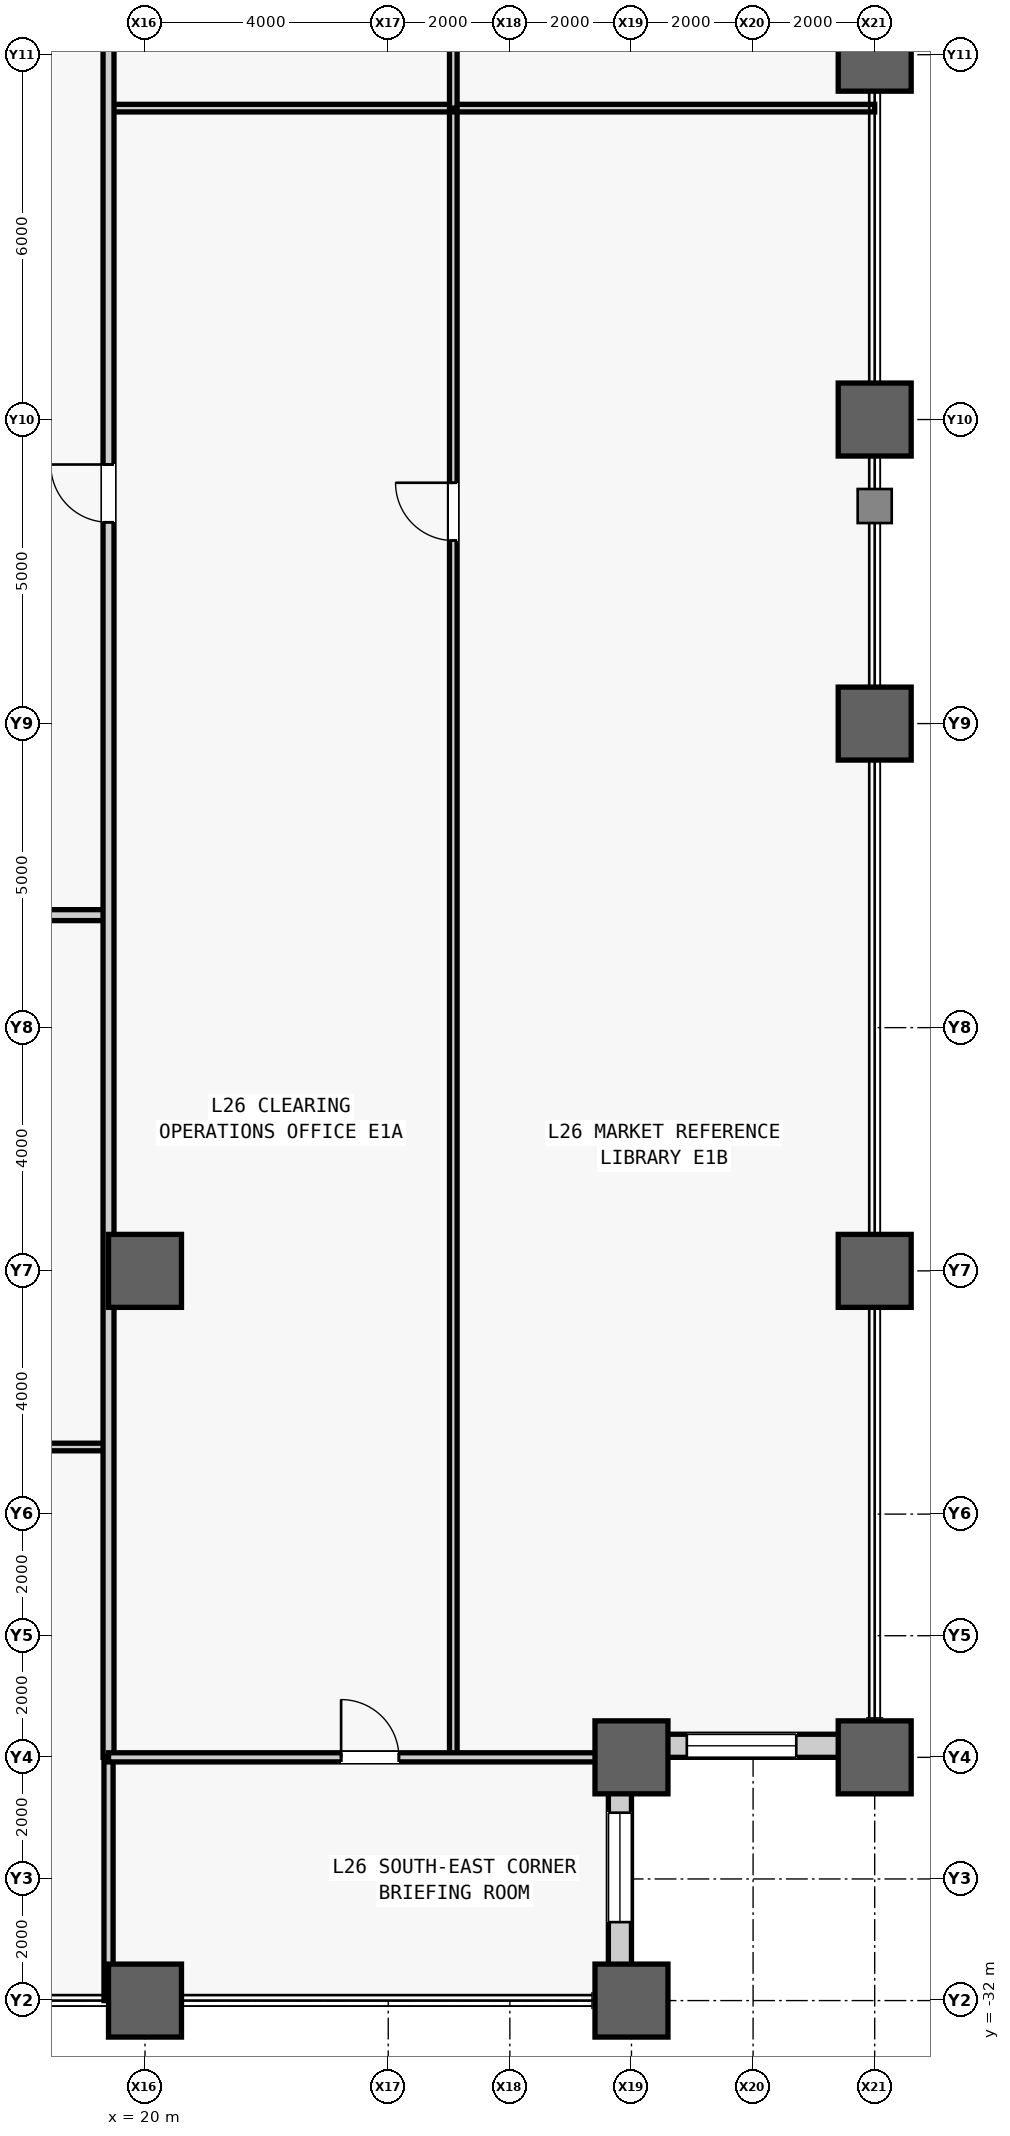
"""IFC4 building model, lengths in metres.
Left out: names, types, materials, properties, quantities, classifications, styles, units other than length and angle.
Written with IfcOpenShell. Run it as: python <this file> out.ifc"""

import sys

from ifc_helpers import new_model, si_unit, direction, frame, frame_2d, origin, origin_2d, place, context, subcontext, project, spatial, rectangle, hollow_rectangle, extrude, source, transform, mapped, element, fill, save


model = new_model("IFC4")
c1 = context("Model", 3, precision=1e-05, world=origin(), true_north=direction((0.0, 1.0)))
c2 = subcontext(c1, "Body", "Model", "MODEL_VIEW")
j1 = project(units=[si_unit("LENGTHUNIT", "METRE"), si_unit("PLANEANGLEUNIT", "RADIAN")], contexts=[c1])
p1 = place(None, origin())
s1 = spatial("IfcSite", under=j1, at=p1, CompositionType="ELEMENT")
p2 = place(p1, origin())
s2 = spatial("IfcBuilding", under=s1, at=p2, CompositionType="ELEMENT")
p3 = place(p2, frame((0.0, 0.0, 116.0)))
s3 = spatial("IfcBuildingStorey", under=s2, at=p3, CompositionType="ELEMENT", Elevation=116.0)
m1 = source(origin(), c2, "Body", "SweptSolid", [
    extrude(hollow_rectangle(XDim=1.2, YDim=1.2, WallThickness=0.07, at=origin_2d()), origin(), (0.0, 0.0, 1.0), 4.1),
])
for number, where, z_axis, x_axis in (
    (1, (20.0, -32.0, 0.0), (0.0, 0.0, 1.0), (1.0, 0.0, 0.0)),
    (2, (20.0, -20.0, 0.0), (0.0, 0.0, 1.0), (1.0, 0.0, 0.0)),
    (3, (28.0, -32.0, 0.0), (0.0, 0.0, 1.0), (1.0, 0.0, 0.0)),
    (4, (28.0, -28.0, 0.0), (0.0, 0.0, 1.0), (1.0, 0.0, 0.0)),
    (5, (32.0, -28.0, 0.0), (0.0, 0.0, 1.0), (1.0, 0.0, 0.0)),
    (6, (32.0, -20.0, 0.0), (0.0, 0.0, 1.0), (1.0, 0.0, 0.0)),
    (7, (32.0, -11.0, 0.0), (0.0, 0.0, 1.0), (1.0, 0.0, 0.0)),
    (8, (32.0, -6.0, 0.0), (0.0, 0.0, 1.0), (1.0, 0.0, 0.0)),
    (9, (32.0, 0.0, 0.0), (0.0, 0.0, 1.0), (1.0, 0.0, 0.0)),
):
    element("IfcColumn", number, at=place(p3, frame(where, z_axis=z_axis, x_axis=x_axis)), inside=s3, PredefinedType="COLUMN", context=c2, shape_type="MappedRepresentation", body=[
        mapped(m1, transform((0.0, 0.0, 0.0), scale=1.0)),
    ])
m2 = source(origin(), c2, "Body", "SweptSolid", [
    extrude(rectangle(XDim=3.62, YDim=0.38, at=frame_2d((1.81, 0.0))), origin(), (0.0, 0.0, 1.0), 3.145),
])
p4 = place(p3, frame((27.81, -31.62, 0.0), z_axis=(0.0, 0.0, 1.0), x_axis=(0.0, 1.0, 0.0)))
e10 = element("IfcWall", 10, at=p4, inside=s3, PredefinedType="STANDARD", context=c2, shape_type="MappedRepresentation", body=[
    mapped(m2, transform((0.0, 0.0, 0.0), scale=1.0)),
])
m3 = source(origin(), c2, "Body", "SweptSolid", [
    extrude(rectangle(XDim=1.8, YDim=2.4, at=frame_2d((0.9, 1.2))), frame((0.0, 0.2, 0.0), z_axis=(0.0, -1.0, 0.0), x_axis=(1.0, 0.0, 0.0)), (0.0, 0.0, 1.0), 0.4),
])
p5 = place(p4, frame((0.91, 0.0, 0.5)))
e11 = element("IfcOpeningElement", 11, at=p5, cuts=e10, PredefinedType="OPENING", context=c2, shape_type="MappedRepresentation", body=[
    mapped(m3, transform((0.0, 0.0, 0.0), scale=1.0)),
])
p6 = place(p3, frame((28.0, -27.81, 0.0), z_axis=(0.0, 0.0, 1.0), x_axis=(1.0, 0.0, 0.0)))
e12 = element("IfcWall", 12, at=p6, inside=s3, PredefinedType="STANDARD", context=c2, shape_type="MappedRepresentation", body=[
    mapped(m2, transform((0.0, 0.0, 0.0), scale=1.0)),
])
p7 = place(p6, frame((0.91, 0.0, 0.5)))
e13 = element("IfcOpeningElement", 13, at=p7, cuts=e12, PredefinedType="OPENING", context=c2, shape_type="MappedRepresentation", body=[
    mapped(m3, transform((0.0, 0.0, 0.0), scale=1.0)),
])
m4 = source(origin(), c2, "Body", "SweptSolid", [
    extrude(rectangle(XDim=37.95, YDim=0.125, at=frame_2d((18.975, 0.0))), origin(), (0.0, 0.0, 1.0), 3.84),
])
p8 = place(p3, frame((-18.55, -22.896, 0.0), z_axis=(0.0, 0.0, 1.0), x_axis=(1.0, 0.0, 0.0)))
e14 = element("IfcWall", 14, at=p8, inside=s3, PredefinedType="PARTITIONING", context=c2, shape_type="MappedRepresentation", body=[
    mapped(m4, transform((0.0, 0.0, 0.0), scale=1.0)),
])
m5 = source(origin(), c2, "Body", "SweptSolid", [
    extrude(rectangle(XDim=0.95, YDim=2.15, at=frame_2d((0.475, 1.075))), frame((0.0, 0.073, 0.0), z_axis=(0.0, -1.0, 0.0), x_axis=(1.0, 0.0, 0.0)), (0.0, 0.0, 1.0), 0.145),
])
p9 = place(p8, frame((18.5, 0.0, 0.0)))
e15 = element("IfcOpeningElement", 15, at=p9, cuts=e14, PredefinedType="OPENING", context=c2, shape_type="MappedRepresentation", body=[
    mapped(m5, transform((0.0, 0.0, 0.0), scale=1.0)),
])
m6 = source(origin(), c2, "Body", "SweptSolid", [
    extrude(rectangle(XDim=37.95, YDim=0.18, at=frame_2d((18.975, 0.0))), origin(), (0.0, 0.0, 1.0), 3.84),
])
p10 = place(p3, frame((-18.55, -14.15, 0.0), z_axis=(0.0, 0.0, 1.0), x_axis=(1.0, 0.0, 0.0)))
e16 = element("IfcWall", 16, at=p10, inside=s3, PredefinedType="PARTITIONING", context=c2, shape_type="MappedRepresentation", body=[
    mapped(m6, transform((0.0, 0.0, 0.0), scale=1.0)),
])
m7 = source(origin(), c2, "Body", "SweptSolid", [
    extrude(rectangle(XDim=1.05, YDim=2.2, at=frame_2d((0.525, 1.1))), frame((0.0, 0.1, 0.0), z_axis=(0.0, -1.0, 0.0), x_axis=(1.0, 0.0, 0.0)), (0.0, 0.0, 1.0), 0.2),
])
p11 = place(p10, frame((18.025, 0.0, 0.0)))
e17 = element("IfcOpeningElement", 17, at=p11, cuts=e16, PredefinedType="OPENING", context=c2, shape_type="MappedRepresentation", body=[
    mapped(m7, transform((0.0, 0.0, 0.0), scale=1.0)),
])
m8 = source(origin(), c2, "Body", "SweptSolid", [
    extrude(rectangle(XDim=4.0, YDim=0.15, at=frame_2d((2.0, 0.0))), origin(), (0.0, 0.0, 1.0), 3.84),
])
p12 = place(p3, frame((19.4, -32.0, 0.0), z_axis=(0.0, 0.0, 1.0), x_axis=(0.0, 1.0, 0.0)))
e18 = element("IfcWall", 18, at=p12, inside=s3, PredefinedType="PARTITIONING", context=c2, shape_type="MappedRepresentation", body=[
    mapped(m8, transform((0.0, 0.0, 0.0), scale=1.0)),
])
m9 = source(origin(), c2, "Body", "SweptSolid", [
    extrude(rectangle(XDim=27.121, YDim=0.125, at=frame_2d((13.561, 0.0))), origin(), (0.0, 0.0, 1.0), 3.84),
])
p13 = place(p3, frame((25.07, -28.0, 0.0), z_axis=(0.0, 0.0, 1.0), x_axis=(0.0, 1.0, 0.0)))
e19 = element("IfcWall", 19, at=p13, inside=s3, PredefinedType="PARTITIONING", context=c2, shape_type="MappedRepresentation", body=[
    mapped(m9, transform((0.0, 0.0, 0.0), scale=1.0)),
])
p14 = place(p13, frame((20.01, 0.0, 0.0)))
e20 = element("IfcOpeningElement", 20, at=p14, cuts=e19, PredefinedType="OPENING", context=c2, shape_type="MappedRepresentation", body=[
    mapped(m5, transform((0.0, 0.0, 0.0), scale=1.0)),
])
m10 = source(origin(), c2, "Body", "SweptSolid", [
    extrude(rectangle(XDim=12.6, YDim=0.125, at=frame_2d((6.3, 0.0))), origin(), (0.0, 0.0, 1.0), 3.84),
])
p15 = place(p3, frame((19.4, -0.879, 0.0), z_axis=(0.0, 0.0, 1.0), x_axis=(1.0, 0.0, 0.0)))
e21 = element("IfcWall", 21, at=p15, inside=s3, PredefinedType="PARTITIONING", context=c2, shape_type="MappedRepresentation", body=[
    mapped(m10, transform((0.0, 0.0, 0.0), scale=1.0)),
])
m11 = source(origin(), c2, "Body", "SweptSolid", [
    extrude(rectangle(XDim=28.879, YDim=0.125, at=frame_2d((14.439, 0.0))), origin(), (0.0, 0.0, 1.0), 3.84),
])
p16 = place(p3, frame((25.07, -0.879, 0.0), z_axis=(0.0, 0.0, 1.0), x_axis=(0.0, 1.0, 0.0)))
e22 = element("IfcWall", 22, at=p16, inside=s3, PredefinedType="PARTITIONING", context=c2, shape_type="MappedRepresentation", body=[
    mapped(m11, transform((0.0, 0.0, 0.0), scale=1.0)),
])
p17 = place(p16, frame((7.314, 0.0, 0.0)))
e23 = element("IfcOpeningElement", 23, at=p17, cuts=e22, PredefinedType="OPENING", context=c2, shape_type="MappedRepresentation", body=[
    mapped(m5, transform((0.0, 0.0, 0.0), scale=1.0)),
])
m12 = source(origin(), c2, "Body", "SweptSolid", [
    extrude(rectangle(XDim=56.0, YDim=0.18, at=frame_2d((28.0, 0.0))), origin(), (0.0, 0.0, 1.0), 3.371),
])
p18 = place(p3, frame((19.4, -28.0, 0.0), z_axis=(0.0, 0.0, 1.0), x_axis=(0.0, 1.0, 0.0)))
e24 = element("IfcWall", 24, at=p18, inside=s3, PredefinedType="PARTITIONING", context=c2, shape_type="MappedRepresentation", body=[
    mapped(m12, transform((0.0, 0.0, 0.0), scale=1.0)),
])
m13 = source(origin(), c2, "Body", "SweptSolid", [
    extrude(rectangle(XDim=0.95, YDim=2.15, at=frame_2d((0.475, 1.075))), frame((0.0, 0.1, 0.0), z_axis=(0.0, -1.0, 0.0), x_axis=(1.0, 0.0, 0.0)), (0.0, 0.0, 1.0), 0.2),
])
p19 = place(p18, frame((20.311, 0.0, 0.0)))
e25 = element("IfcOpeningElement", 25, at=p19, cuts=e24, PredefinedType="OPENING", context=c2, shape_type="MappedRepresentation", body=[
    mapped(m13, transform((0.0, 0.0, 0.0), scale=1.0)),
])
p20 = place(p18, frame((34.135, 0.0, 0.0)))
e26 = element("IfcOpeningElement", 26, at=p20, cuts=e24, PredefinedType="OPENING", context=c2, shape_type="MappedRepresentation", body=[
    mapped(m13, transform((0.0, 0.0, 0.0), scale=1.0)),
])
m14 = source(origin(), c2, "Body", "SweptSolid", [
    extrude(rectangle(XDim=8.6, YDim=0.15, at=frame_2d((4.3, 0.0))), origin(), (0.0, 0.0, 1.0), 3.84),
])
p21 = place(p3, frame((19.4, -28.0, 0.0), z_axis=(0.0, 0.0, 1.0), x_axis=(1.0, 0.0, 0.0)))
e27 = element("IfcWall", 27, at=p21, inside=s3, PredefinedType="PARTITIONING", context=c2, shape_type="MappedRepresentation", body=[
    mapped(m14, transform((0.0, 0.0, 0.0), scale=1.0)),
])
m15 = source(origin(), c2, "Body", "SweptSolid", [
    extrude(rectangle(XDim=0.95, YDim=2.15, at=frame_2d((0.475, 1.075))), frame((0.0, 0.085, 0.0), z_axis=(0.0, -1.0, 0.0), x_axis=(1.0, 0.0, 0.0)), (0.0, 0.0, 1.0), 0.17),
])
p22 = place(p21, frame((3.825, 0.0, 0.0)))
e28 = element("IfcOpeningElement", 28, at=p22, cuts=e27, PredefinedType="OPENING", context=c2, shape_type="MappedRepresentation", body=[
    mapped(m15, transform((0.0, 0.0, 0.0), scale=1.0)),
])
m16 = source(origin(), c2, "Body", "SweptSolid", [
    extrude(rectangle(XDim=1.8, YDim=2.4, at=frame_2d((0.9, 1.2))), frame((0.0, 0.03, 0.0), z_axis=(0.0, -1.0, 0.0), x_axis=(1.0, 0.0, 0.0)), (0.0, 0.0, 1.0), 0.06),
])
p23 = place(p5, origin())
e29 = element("IfcWindow", 29, at=p23, inside=s3, PartitioningType="SINGLE_PANEL", PredefinedType="WINDOW", context=c2, shape_type="MappedRepresentation", body=[
    mapped(m16, transform((0.0, 0.0, 0.0), scale=1.0)),
])
fill(e11, e29)
p24 = place(p7, origin())
e30 = element("IfcWindow", 30, at=p24, inside=s3, PartitioningType="SINGLE_PANEL", PredefinedType="WINDOW", context=c2, shape_type="MappedRepresentation", body=[
    mapped(m16, transform((0.0, 0.0, 0.0), scale=1.0)),
])
fill(e13, e30)
m17 = source(origin(), c2, "Body", "SweptSolid", [
    extrude(rectangle(XDim=0.95, YDim=2.15, at=frame_2d((0.475, 1.075))), frame((0.0, 0.025, 0.0), z_axis=(0.0, -1.0, 0.0), x_axis=(1.0, 0.0, 0.0)), (0.0, 0.0, 1.0), 0.05),
])
p25 = place(p14, origin())
e31 = element("IfcDoor", 31, at=p25, inside=s3, OperationType="SINGLE_SWING_RIGHT", PredefinedType="DOOR", context=c2, shape_type="MappedRepresentation", body=[
    mapped(m17, transform((0.0, 0.0, 0.0), scale=1.0)),
])
fill(e20, e31)
p26 = place(p19, origin())
e32 = element("IfcDoor", 32, at=p26, inside=s3, OperationType="SINGLE_SWING_RIGHT", PredefinedType="DOOR", context=c2, shape_type="MappedRepresentation", body=[
    mapped(m17, transform((0.0, 0.0, 0.0), scale=1.0)),
])
fill(e25, e32)
p27 = place(p22, origin())
e33 = element("IfcDoor", 33, at=p27, inside=s3, OperationType="SINGLE_SWING_LEFT", PredefinedType="DOOR", context=c2, shape_type="MappedRepresentation", body=[
    mapped(m17, transform((0.0, 0.0, 0.0), scale=1.0)),
])
fill(e28, e33)
save(model, sys.argv[1])
